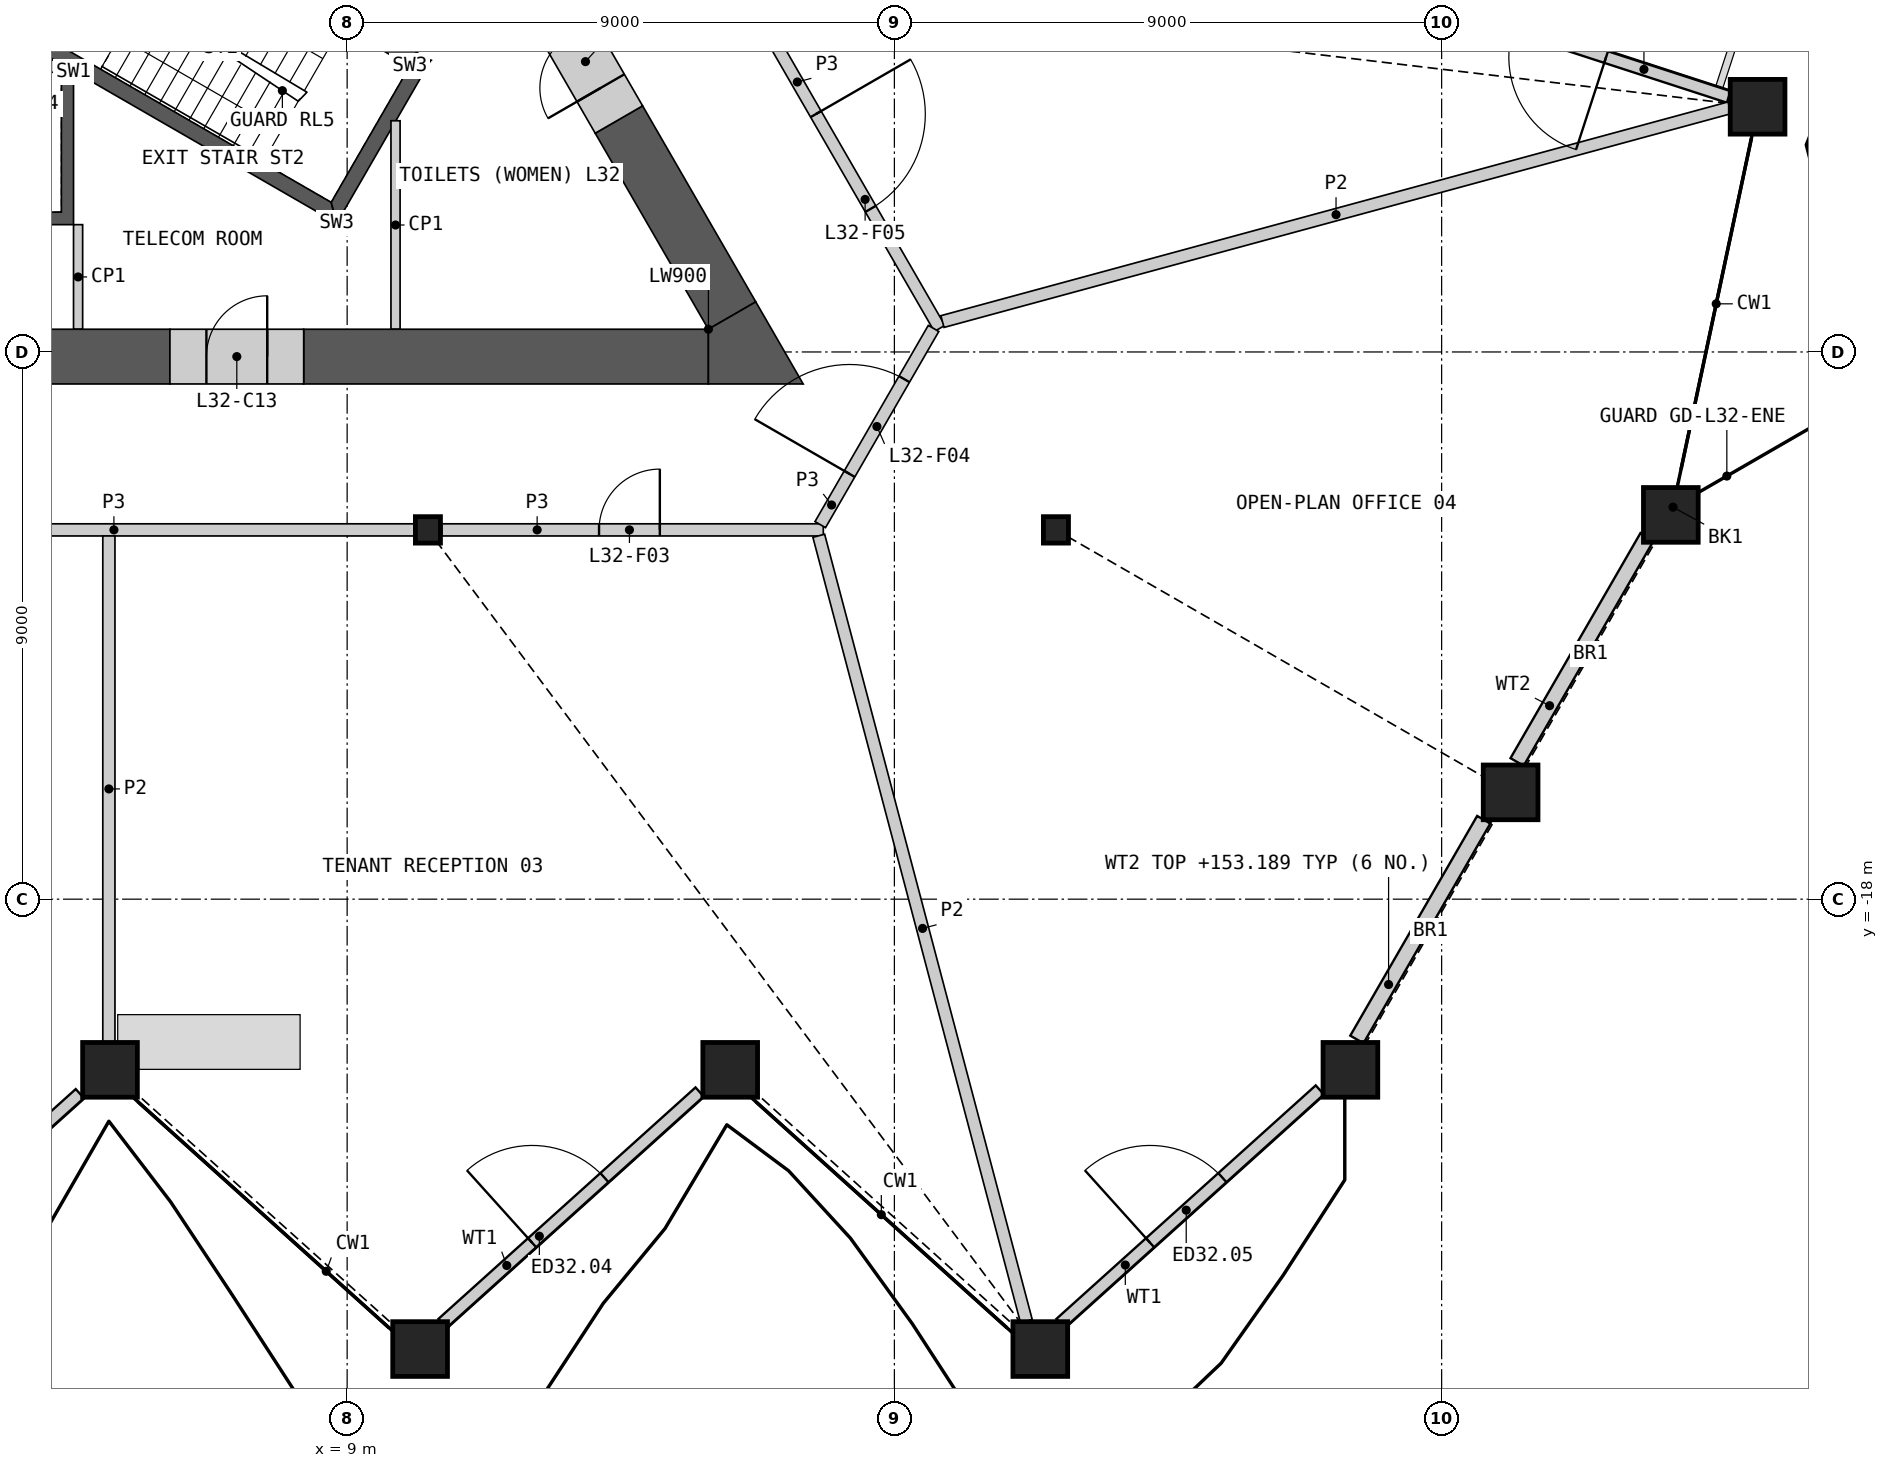
"""IFC4 building model, lengths in metres.
Left out: names, types, materials, properties, quantities, classifications, styles, units other than length and angle.
Written with IfcOpenShell. Run it as: python <this file> out.ifc"""

import sys

from ifc_helpers import new_model, si_unit, direction, frame, frame_2d, origin, origin_2d, place, context, subcontext, project, spatial, polyline, rectangle, hollow_rectangle, i_section, outline, extrude, element, fill, save


model = new_model("IFC4")
c1 = context("Model", 3, precision=1e-05, world=origin(), true_north=direction((0.0, 1.0)))
c2 = subcontext(c1, "Body", "Model", "MODEL_VIEW")
j1 = project(units=[si_unit("LENGTHUNIT", "METRE"), si_unit("PLANEANGLEUNIT", "RADIAN")], contexts=[c1])
p1 = place(None, origin())
s1 = spatial("IfcSite", under=j1, at=p1, CompositionType="ELEMENT")
p2 = place(p1, origin())
s2 = spatial("IfcBuilding", under=s1, at=p2, CompositionType="ELEMENT")
p3 = place(p2, frame((0.0, 0.0, 150.0)))
s3 = spatial("IfcBuildingStorey", under=s2, at=p3, CompositionType="ELEMENT", Elevation=150.0)
for number, where, z_axis, x_axis in (
    (1, (5.1, -20.807, 0.0), (0.0, 0.0, 1.0), (1.0, 0.0, 0.0)),
    (2, (10.2, -25.399, 0.0), (0.0, 0.0, 1.0), (1.0, 0.0, 0.0)),
    (3, (15.3, -20.807, 0.0), (0.0, 0.0, 1.0), (1.0, 0.0, 0.0)),
    (4, (20.4, -25.399, 0.0), (0.0, 0.0, 1.0), (1.0, 0.0, 0.0)),
    (5, (25.5, -20.807, 0.0), (0.0, 0.0, 1.0), (1.0, 0.0, 0.0)),
    (6, (28.135, -16.243, 0.0), (0.0, 0.0, 1.0), (1.0, 0.0, 0.0)),
    (7, (30.769, -11.68, 0.0), (0.0, 0.0, 1.0), (1.0, 0.0, 0.0)),
    (8, (32.196, -4.967, 0.0), (0.0, 0.0, 1.0), (1.0, 0.0, 0.0)),
):
    element("IfcColumn", number, at=place(p3, frame(where, z_axis=z_axis, x_axis=x_axis)), inside=s3, PredefinedType="COLUMN", context=c2, shape_type="SweptSolid", body=[
        extrude(hollow_rectangle(XDim=0.9, YDim=0.9, WallThickness=0.06, at=origin_2d()), origin(), (0.0, 0.0, 1.0), 4.2),
    ])
for number, where, z_axis, x_axis in (
    (9, (10.328, -11.926, 0.0), (0.0, 0.0, 1.0), (1.0, 0.0, 0.0)),
    (10, (20.657, -11.926, 0.0), (0.0, 0.0, 1.0), (1.0, 0.0, 0.0)),
):
    element("IfcColumn", number, at=place(p3, frame(where, z_axis=z_axis, x_axis=x_axis)), inside=s3, PredefinedType="COLUMN", context=c2, shape_type="SweptSolid", body=[
        extrude(i_section(OverallWidth=0.412, OverallDepth=0.435, WebThickness=0.036, FlangeThickness=0.057, at=origin_2d()), origin(), (0.0, 0.0, 1.0), 4.2),
    ])
p4 = place(p3, frame((0.406, -24.977, 0.0), z_axis=(0.0, 0.0, 1.0), x_axis=(0.743158726114, 0.669115167815, 0.0)))
e11 = element("IfcWall", 11, at=p4, inside=s3, PredefinedType="SOLIDWALL", context=c2, shape_type="SweptSolid", body=[
    extrude(rectangle(XDim=5.648, YDim=0.2, at=frame_2d((2.824, 0.0))), origin(), (0.0, 0.0, 1.0), 3.189),
])
p5 = place(p4, frame((1.983, 0.0, 0.0)))
e12 = element("IfcOpeningElement", 12, at=p5, cuts=e11, PredefinedType="OPENING", context=c2, shape_type="SweptSolid", body=[
    extrude(rectangle(XDim=1.6, YDim=2.4, at=frame_2d((0.8, 1.2))), frame((0.0, 0.11, 0.0), z_axis=(0.0, -1.0, 0.0), x_axis=(1.0, 0.0, 0.0)), (0.0, 0.0, 1.0), 0.22),
])
p6 = place(p3, frame((10.569, -24.977, 0.0), z_axis=(0.0, 0.0, 1.0), x_axis=(0.743151159824, 0.669123571287, 0.0)))
e13 = element("IfcWall", 13, at=p6, inside=s3, PredefinedType="SOLIDWALL", context=c2, shape_type="SweptSolid", body=[
    extrude(rectangle(XDim=5.689, YDim=0.2, at=frame_2d((2.844, 0.0))), origin(), (0.0, 0.0, 1.0), 3.189),
])
p7 = place(p6, frame((1.983, 0.0, 0.0)))
e14 = element("IfcOpeningElement", 14, at=p7, cuts=e13, PredefinedType="OPENING", context=c2, shape_type="SweptSolid", body=[
    extrude(rectangle(XDim=1.6, YDim=2.4, at=frame_2d((0.8, 1.2))), frame((0.0, 0.11, 0.0), z_axis=(0.0, -1.0, 0.0), x_axis=(1.0, 0.0, 0.0)), (0.0, 0.0, 1.0), 0.22),
])
p8 = place(p3, frame((20.731, -24.977, 0.0), z_axis=(0.0, 0.0, 1.0), x_axis=(0.743150280241, 0.669124548181, 0.0)))
e15 = element("IfcWall", 15, at=p8, inside=s3, PredefinedType="SOLIDWALL", context=c2, shape_type="SweptSolid", body=[
    extrude(rectangle(XDim=5.739, YDim=0.2, at=frame_2d((2.869, 0.0))), origin(), (0.0, 0.0, 1.0), 3.189),
])
p9 = place(p8, frame((1.983, 0.0, 0.0)))
e16 = element("IfcOpeningElement", 16, at=p9, cuts=e15, PredefinedType="OPENING", context=c2, shape_type="SweptSolid", body=[
    extrude(rectangle(XDim=1.6, YDim=2.4, at=frame_2d((0.8, 1.2))), frame((0.0, 0.11, 0.0), z_axis=(0.0, -1.0, 0.0), x_axis=(1.0, 0.0, 0.0)), (0.0, 0.0, 1.0), 0.22),
])
p10 = place(p3, frame((25.606, -20.307, 0.0), z_axis=(0.0, 0.0, 1.0), x_axis=(0.500002690545, 0.866023850392, 0.0)))
e17 = element("IfcWall", 17, at=p10, inside=s3, PredefinedType="SOLIDWALL", context=c2, shape_type="SweptSolid", body=[
    extrude(rectangle(XDim=4.173, YDim=0.25, at=frame_2d((2.086, 0.0))), origin(), (0.0, 0.0, 1.0), 3.189),
])
p11 = place(p3, frame((28.241, -15.743, 0.0), z_axis=(0.0, 0.0, 1.0), x_axis=(0.499995966399, 0.866027732573, 0.0)))
e18 = element("IfcWall", 18, at=p11, inside=s3, PredefinedType="SOLIDWALL", context=c2, shape_type="SweptSolid", body=[
    extrude(rectangle(XDim=4.275, YDim=0.25, at=frame_2d((2.138, 0.0))), origin(), (0.0, 0.0, 1.0), 3.189),
])
p12 = place(p3, frame((31.721, -4.805, 0.0), z_axis=(0.0, 0.0, 1.0), x_axis=(-0.951053952554, 0.309024884649, 0.0)))
e19 = element("IfcWall", 19, at=p12, inside=s3, PredefinedType="SOLIDWALL", context=c2, shape_type="SweptSolid", body=[
    extrude(rectangle(XDim=5.865, YDim=0.2, at=frame_2d((2.932, 0.0))), origin(), (0.0, 0.0, 1.0), 2.885),
])
p13 = place(p12, frame((2.12, 0.0, 0.0)))
e20 = element("IfcOpeningElement", 20, at=p13, cuts=e19, PredefinedType="OPENING", context=c2, shape_type="SweptSolid", body=[
    extrude(rectangle(XDim=1.6, YDim=2.4, at=frame_2d((0.8, 1.2))), frame((0.0, 0.11, 0.0), z_axis=(0.0, -1.0, 0.0), x_axis=(1.0, 0.0, 0.0)), (0.0, 0.0, 1.0), 0.22),
])
p14 = place(p3, origin())
e21 = element("IfcWall", 21, at=p14, inside=s3, PredefinedType="SHEAR", context=c2, shape_type="SweptSolid", body=[
    extrude(outline(polyline([(4.5, -4.4), (4.5, -6.906), (-4.5, -6.906), (-4.5, -4.4), (-4.3, -4.4), (-4.3, -6.7), (-2.3, -6.7), (-2.3, -4.4), (-2.1, -4.4), (-2.1, -6.7), (-0.1, -6.7), (-0.1, -4.4), (0.1, -4.4), (0.1, -6.7), (2.1, -6.7), (2.1, -4.4), (2.3, -4.4), (2.3, -6.7), (4.3, -6.7), (4.3, -4.4), (4.5, -4.4)])), origin(), (0.0, 0.0, 1.0), 3.8),
])
p15 = place(p3, frame((-4.187, -4.3, 0.0), z_axis=(0.0, 0.0, 1.0), x_axis=(1.0, 0.0, 0.0)))
e22 = element("IfcWall", 22, at=p15, inside=s3, PredefinedType="SOLIDWALL", context=c2, shape_type="SweptSolid", body=[
    extrude(rectangle(XDim=8.373, YDim=0.2, at=frame_2d((4.187, 0.0))), origin(), (0.0, 0.0, 1.0), 3.8),
])
p16 = place(p15, frame((0.287, 0.0, 0.0)))
e23 = element("IfcOpeningElement", 23, at=p16, cuts=e22, PredefinedType="OPENING", context=c2, shape_type="SweptSolid", body=[
    extrude(rectangle(XDim=1.2, YDim=2.1, at=frame_2d((0.6, 1.05))), frame((0.0, 0.11, 0.0), z_axis=(0.0, -1.0, 0.0), x_axis=(1.0, 0.0, 0.0)), (0.0, 0.0, 1.0), 0.22),
])
p17 = place(p15, frame((2.387, 0.0, 0.0)))
e24 = element("IfcOpeningElement", 24, at=p17, cuts=e22, PredefinedType="OPENING", context=c2, shape_type="SweptSolid", body=[
    extrude(rectangle(XDim=1.4, YDim=2.1, at=frame_2d((0.7, 1.05))), frame((0.0, 0.11, 0.0), z_axis=(0.0, -1.0, 0.0), x_axis=(1.0, 0.0, 0.0)), (0.0, 0.0, 1.0), 0.22),
])
p18 = place(p15, frame((4.737, 0.0, 0.0)))
e25 = element("IfcOpeningElement", 25, at=p18, cuts=e22, PredefinedType="OPENING", context=c2, shape_type="SweptSolid", body=[
    extrude(rectangle(XDim=1.1, YDim=2.1, at=frame_2d((0.55, 1.05))), frame((0.0, 0.11, 0.0), z_axis=(0.0, -1.0, 0.0), x_axis=(1.0, 0.0, 0.0)), (0.0, 0.0, 1.0), 0.22),
])
p19 = place(p15, frame((6.887, 0.0, 0.0)))
e26 = element("IfcOpeningElement", 26, at=p19, cuts=e22, PredefinedType="OPENING", context=c2, shape_type="SweptSolid", body=[
    extrude(rectangle(XDim=1.2, YDim=2.1, at=frame_2d((0.6, 1.05))), frame((0.0, 0.11, 0.0), z_axis=(0.0, -1.0, 0.0), x_axis=(1.0, 0.0, 0.0)), (0.0, 0.0, 1.0), 0.22),
])
p20 = place(p3, origin())
e27 = element("IfcWall", 27, at=p20, inside=s3, PredefinedType="SHEAR", context=c2, shape_type="SweptSolid", body=[
    extrude(outline(polyline([(3.763, -3.956), (8.83, -6.881), (8.738, -6.539), (3.888, -3.739), (3.763, -3.956)])), origin(), (0.0, 0.0, 1.0), 3.8),
])
p21 = place(p3, origin())
e28 = element("IfcWall", 28, at=p21, inside=s3, PredefinedType="SHEAR", context=c2, shape_type="SweptSolid", body=[
    extrude(outline(polyline([(8.83, -6.881), (10.374, -4.206), (10.032, -4.298), (8.738, -6.539), (8.83, -6.881)])), origin(), (0.0, 0.0, 1.0), 3.8),
])
p22 = place(p3, origin())
e29 = element("IfcWall", 29, at=p22, inside=s3, PredefinedType="SHEAR", context=c2, shape_type="SweptSolid", body=[
    extrude(outline(polyline([(10.032, -4.298), (10.374, -4.206), (5.307, -1.281), (5.182, -1.498), (10.032, -4.298)])), origin(), (0.0, 0.0, 1.0), 3.8),
])
p23 = place(p3, frame((4.575, -6.906, 0.0), z_axis=(0.0, 0.0, 1.0), x_axis=(0.0, -1.0, 0.0)))
e30 = element("IfcWall", 30, at=p23, inside=s3, PredefinedType="PARTITIONING", context=c2, shape_type="SweptSolid", body=[
    extrude(rectangle(XDim=1.72, YDim=0.15, at=frame_2d((0.86, 0.0))), origin(), (0.0, 0.0, 1.0), 3.8),
])
p24 = place(p3, frame((9.796, -8.626, 0.0), z_axis=(0.0, 0.0, 1.0), x_axis=(0.0, 1.0, 0.0)))
e31 = element("IfcWall", 31, at=p24, inside=s3, PredefinedType="PARTITIONING", context=c2, shape_type="SweptSolid", body=[
    extrude(rectangle(XDim=3.429, YDim=0.15, at=frame_2d((1.714, 0.0))), origin(), (0.0, 0.0, 1.0), 3.8),
])
p25 = place(p3, frame((8.285, -9.076, 0.0), z_axis=(0.0, 0.0, 1.0), x_axis=(1.0, 0.0, 0.0)))
e32 = element("IfcWall", 32, at=p25, inside=s3, PredefinedType="SHEAR", context=c2, shape_type="SweptSolid", body=[
    extrude(rectangle(XDim=6.656, YDim=0.9, at=frame_2d((3.328, 0.0))), origin(), (0.0, 0.0, 1.0), 3.8),
])
p26 = place(p3, frame((1.1, -9.076, 0.0), z_axis=(0.0, 0.0, 1.0), x_axis=(1.0, 0.0, 0.0)))
e33 = element("IfcWall", 33, at=p26, inside=s3, PredefinedType="SHEAR", context=c2, shape_type="SweptSolid", body=[
    extrude(rectangle(XDim=4.985, YDim=0.9, at=frame_2d((2.493, 0.0))), origin(), (0.0, 0.0, 1.0), 3.8),
])
p27 = place(p3, frame((15.331, -8.401, 0.0), z_axis=(0.0, 0.0, 1.0), x_axis=(-0.499976014784, 0.866039251212, 0.0)))
e34 = element("IfcWall", 34, at=p27, inside=s3, PredefinedType="SHEAR", context=c2, shape_type="SweptSolid", body=[
    extrude(rectangle(XDim=3.723, YDim=0.9, at=frame_2d((1.861, 0.0))), origin(), (0.0, 0.0, 1.0), 3.8),
])
p28 = place(p3, origin())
e35 = element("IfcWall", 35, at=p28, inside=s3, PredefinedType="SHEAR", context=c2, shape_type="SweptSolid", body=[
    extrude(outline(polyline([(14.941, -8.626), (15.721, -8.176), (16.5, -9.526), (14.941, -9.526), (14.941, -8.626)])), origin(), (0.0, 0.0, 1.0), 3.8),
])
p29 = place(p3, frame((6.085, -9.076, 0.0), z_axis=(0.0, 0.0, 1.0), x_axis=(1.0, 0.0, 0.0)))
e36 = element("IfcWall", 36, at=p29, inside=s3, PredefinedType="SHEAR", context=c2, shape_type="SweptSolid", body=[
    extrude(rectangle(XDim=2.2, YDim=0.9, at=frame_2d((1.1, 0.0))), origin(), (0.0, 0.0, 1.0), 3.8),
])
p30 = place(p29, frame((0.6, 0.0, 0.0)))
e37 = element("IfcOpeningElement", 37, at=p30, cuts=e36, PredefinedType="OPENING", context=c2, shape_type="SweptSolid", body=[
    extrude(rectangle(XDim=1.0, YDim=2.1, at=frame_2d((0.5, 1.05))), frame((0.0, 0.46, 0.0), z_axis=(0.0, -1.0, 0.0), x_axis=(1.0, 0.0, 0.0)), (0.0, 0.0, 1.0), 0.92),
])
p31 = place(p3, frame((13.469, -5.177, 0.0), z_axis=(0.0, 0.0, 1.0), x_axis=(-0.50002983664, 0.866008176907, 0.0)))
e38 = element("IfcWall", 38, at=p31, inside=s3, PredefinedType="SHEAR", context=c2, shape_type="SweptSolid", body=[
    extrude(rectangle(XDim=2.2, YDim=0.9, at=frame_2d((1.1, 0.0))), origin(), (0.0, 0.0, 1.0), 3.8),
])
p32 = place(p31, frame((0.6, 0.0, 0.0)))
e39 = element("IfcOpeningElement", 39, at=p32, cuts=e38, PredefinedType="OPENING", context=c2, shape_type="SweptSolid", body=[
    extrude(rectangle(XDim=1.0, YDim=2.1, at=frame_2d((0.5, 1.05))), frame((0.0, 0.46, 0.0), z_axis=(0.0, -1.0, 0.0), x_axis=(1.0, 0.0, 0.0)), (0.0, 0.0, 1.0), 0.92),
])
p33 = place(p3, frame((0.227, -11.926, 0.0), z_axis=(0.0, 0.0, 1.0), x_axis=(1.0, 0.0, 0.0)))
e40 = element("IfcWall", 40, at=p33, inside=s3, PredefinedType="PARTITIONING", context=c2, shape_type="SweptSolid", body=[
    extrude(rectangle(XDim=9.874, YDim=0.2, at=frame_2d((4.937, 0.0))), origin(), (0.0, 0.0, 1.0), 3.8),
])
p34 = place(p3, frame((10.556, -11.926, 0.0), z_axis=(0.0, 0.0, 1.0), x_axis=(1.0, 0.0, 0.0)))
e41 = element("IfcWall", 41, at=p34, inside=s3, PredefinedType="PARTITIONING", context=c2, shape_type="SweptSolid", body=[
    extrude(rectangle(XDim=6.275, YDim=0.2, at=frame_2d((3.137, 0.0))), origin(), (0.0, 0.0, 1.0), 3.8),
])
p35 = place(p34, frame((2.587, 0.0, 0.0)))
e42 = element("IfcOpeningElement", 42, at=p35, cuts=e41, PredefinedType="OPENING", context=c2, shape_type="SweptSolid", body=[
    extrude(rectangle(XDim=1.0, YDim=2.1, at=frame_2d((0.5, 1.05))), frame((0.0, 0.11, 0.0), z_axis=(0.0, -1.0, 0.0), x_axis=(1.0, 0.0, 0.0)), (0.0, 0.0, 1.0), 0.22),
])
p36 = place(p3, frame((15.624, -3.209, 0.0), z_axis=(0.0, 0.0, 1.0), x_axis=(0.499997920671, -0.866026604282, 0.0)))
e43 = element("IfcWall", 43, at=p36, inside=s3, PredefinedType="PARTITIONING", context=c2, shape_type="SweptSolid", body=[
    extrude(rectangle(XDim=6.24, YDim=0.2, at=frame_2d((3.12, 0.0))), origin(), (0.0, 0.0, 1.0), 3.8),
])
p37 = place(p36, frame((2.169, 0.0, 0.0)))
e44 = element("IfcOpeningElement", 44, at=p37, cuts=e43, PredefinedType="OPENING", context=c2, shape_type="SweptSolid", body=[
    extrude(rectangle(XDim=1.8, YDim=2.1, at=frame_2d((0.9, 1.05))), frame((0.0, 0.11, 0.0), z_axis=(0.0, -1.0, 0.0), x_axis=(1.0, 0.0, 0.0)), (0.0, 0.0, 1.0), 0.22),
])
p38 = place(p3, frame((16.781, -11.84, 0.0), z_axis=(0.0, 0.0, 1.0), x_axis=(0.499958791762, 0.866049194065, 0.0)))
e45 = element("IfcWall", 45, at=p38, inside=s3, PredefinedType="PARTITIONING", context=c2, shape_type="SweptSolid", body=[
    extrude(rectangle(XDim=3.726, YDim=0.2, at=frame_2d((1.863, 0.0))), origin(), (0.0, 0.0, 1.0), 3.8),
])
p39 = place(p38, frame((0.963, 0.0, 0.0)))
e46 = element("IfcOpeningElement", 46, at=p39, cuts=e45, PredefinedType="OPENING", context=c2, shape_type="SweptSolid", body=[
    extrude(rectangle(XDim=1.8, YDim=2.1, at=frame_2d((0.9, 1.05))), frame((0.0, 0.11, 0.0), z_axis=(0.0, -1.0, 0.0), x_axis=(1.0, 0.0, 0.0)), (0.0, 0.0, 1.0), 0.22),
])
p40 = place(p3, frame((18.79, -8.5, 0.0), z_axis=(0.0, 0.0, 1.0), x_axis=(0.965038802525, 0.262107057556, 0.0)))
e47 = element("IfcWall", 47, at=p40, inside=s3, PredefinedType="PARTITIONING", context=c2, shape_type="SweptSolid", body=[
    extrude(rectangle(XDim=13.415, YDim=0.2, at=frame_2d((6.708, 0.0))), origin(), (0.0, 0.0, 1.0), 2.885),
])
p41 = place(p3, frame((16.756, -12.023, 0.0), z_axis=(0.0, 0.0, 1.0), x_axis=(0.25554647156, -0.966796773305, 0.0)))
e48 = element("IfcWall", 48, at=p41, inside=s3, PredefinedType="PARTITIONING", context=c2, shape_type="SweptSolid", body=[
    extrude(rectangle(XDim=13.36, YDim=0.2, at=frame_2d((6.68, 0.0))), origin(), (0.0, 0.0, 1.0), 2.885),
])
p42 = place(p3, frame((5.081, -20.347, 0.0), z_axis=(0.0, 0.0, 1.0), x_axis=(0.0, 1.0, 0.0)))
e49 = element("IfcWall", 49, at=p42, inside=s3, PredefinedType="PARTITIONING", context=c2, shape_type="SweptSolid", body=[
    extrude(rectangle(XDim=8.321, YDim=0.2, at=frame_2d((4.16, 0.0))), origin(), (0.0, 0.0, 1.0), 2.885),
])
p43 = place(p7, origin())
e50 = element("IfcDoor", 50, at=p43, inside=s3, OperationType="DOUBLE_DOOR_SINGLE_SWING", PredefinedType="DOOR", context=c2, shape_type="SweptSolid", body=[
    extrude(rectangle(XDim=1.6, YDim=2.4, at=frame_2d((0.8, 1.2))), frame((0.0, 0.025, 0.0), z_axis=(0.0, -1.0, 0.0), x_axis=(1.0, 0.0, 0.0)), (0.0, 0.0, 1.0), 0.05),
])
fill(e14, e50)
p44 = place(p9, origin())
e51 = element("IfcDoor", 51, at=p44, inside=s3, OperationType="DOUBLE_DOOR_SINGLE_SWING", PredefinedType="DOOR", context=c2, shape_type="SweptSolid", body=[
    extrude(rectangle(XDim=1.6, YDim=2.4, at=frame_2d((0.8, 1.2))), frame((0.0, 0.025, 0.0), z_axis=(0.0, -1.0, 0.0), x_axis=(1.0, 0.0, 0.0)), (0.0, 0.0, 1.0), 0.05),
])
fill(e16, e51)
p45 = place(p13, origin())
e52 = element("IfcDoor", 52, at=p45, inside=s3, OperationType="DOUBLE_DOOR_SINGLE_SWING", PredefinedType="DOOR", context=c2, shape_type="SweptSolid", body=[
    extrude(rectangle(XDim=1.6, YDim=2.4, at=frame_2d((0.8, 1.2))), frame((0.0, 0.025, 0.0), z_axis=(0.0, -1.0, 0.0), x_axis=(1.0, 0.0, 0.0)), (0.0, 0.0, 1.0), 0.05),
])
fill(e20, e52)
p46 = place(p30, origin())
e53 = element("IfcDoor", 53, at=p46, inside=s3, OperationType="SINGLE_SWING_RIGHT", PredefinedType="DOOR", context=c2, shape_type="SweptSolid", body=[
    extrude(rectangle(XDim=1.0, YDim=2.1, at=frame_2d((0.5, 1.05))), frame((0.0, 0.205, 0.0), z_axis=(0.0, -1.0, 0.0), x_axis=(1.0, 0.0, 0.0)), (0.0, 0.0, 1.0), 0.05),
])
fill(e37, e53)
p47 = place(p32, origin())
e54 = element("IfcDoor", 54, at=p47, inside=s3, OperationType="SINGLE_SWING_LEFT", PredefinedType="DOOR", context=c2, shape_type="SweptSolid", body=[
    extrude(rectangle(XDim=1.0, YDim=2.1, at=frame_2d((0.5, 1.05))), frame((0.0, 0.205, 0.0), z_axis=(0.0, -1.0, 0.0), x_axis=(1.0, 0.0, 0.0)), (0.0, 0.0, 1.0), 0.05),
])
fill(e39, e54)
p48 = place(p35, origin())
e55 = element("IfcDoor", 55, at=p48, inside=s3, OperationType="SINGLE_SWING_RIGHT", PredefinedType="DOOR", context=c2, shape_type="SweptSolid", body=[
    extrude(rectangle(XDim=1.0, YDim=2.1, at=frame_2d((0.5, 1.05))), frame((0.0, 0.025, 0.0), z_axis=(0.0, -1.0, 0.0), x_axis=(1.0, 0.0, 0.0)), (0.0, 0.0, 1.0), 0.05),
])
fill(e42, e55)
p49 = place(p39, origin())
e56 = element("IfcDoor", 56, at=p49, inside=s3, OperationType="DOUBLE_DOOR_SINGLE_SWING", PredefinedType="DOOR", context=c2, shape_type="SweptSolid", body=[
    extrude(rectangle(XDim=1.8, YDim=2.1, at=frame_2d((0.9, 1.05))), frame((0.0, 0.025, 0.0), z_axis=(0.0, -1.0, 0.0), x_axis=(1.0, 0.0, 0.0)), (0.0, 0.0, 1.0), 0.05),
])
fill(e46, e56)
p50 = place(p37, origin())
e57 = element("IfcDoor", 57, at=p50, inside=s3, OperationType="DOUBLE_DOOR_SINGLE_SWING", PredefinedType="DOOR", context=c2, shape_type="SweptSolid", body=[
    extrude(rectangle(XDim=1.8, YDim=2.1, at=frame_2d((0.9, 1.05))), frame((0.0, 0.025, 0.0), z_axis=(0.0, -1.0, 0.0), x_axis=(1.0, 0.0, 0.0)), (0.0, 0.0, 1.0), 0.05),
])
fill(e44, e57)
save(model, sys.argv[1])
